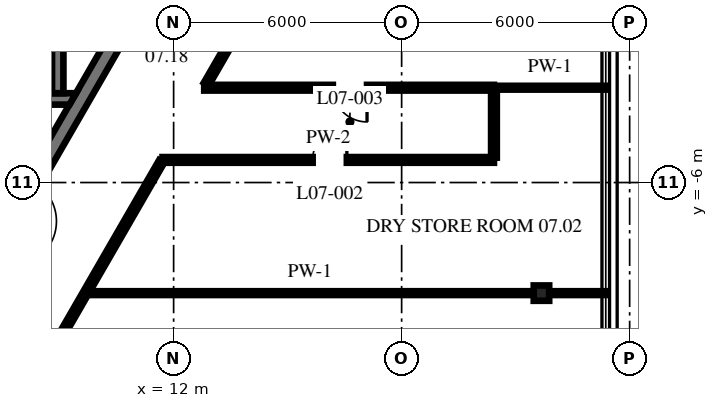
"""IFC4 building model, lengths in metres.
Left out: names, types, materials, properties, quantities, classifications, styles, units other than length and angle.
Written with IfcOpenShell. Run it as: python <this file> out.ifc"""

import sys

from ifc_helpers import new_model, si_unit, direction, frame, frame_2d, origin, origin_2d, place, context, subcontext, project, spatial, polyline, rectangle, i_section, outline, extrude, source, transform, mapped, element, fill, save


model = new_model("IFC4")
c1 = context("Model", 3, precision=1e-05, world=origin(), true_north=direction((0.0, 1.0)))
c2 = subcontext(c1, "Body", "Model", "MODEL_VIEW")
j1 = project(units=[si_unit("LENGTHUNIT", "METRE"), si_unit("PLANEANGLEUNIT", "RADIAN")], contexts=[c1])
p1 = place(None, origin())
s1 = spatial("IfcSite", under=j1, at=p1, CompositionType="ELEMENT")
p2 = place(p1, origin())
s2 = spatial("IfcBuilding", under=s1, at=p2, CompositionType="ELEMENT")
p3 = place(p2, frame((0.0, 0.0, 33.2)))
s3 = spatial("IfcBuildingStorey", under=s2, at=p3, CompositionType="ELEMENT", Elevation=33.2)
m1 = source(origin(), c2, "Body", "SweptSolid", [
    extrude(i_section(OverallWidth=0.404, OverallDepth=0.406, WebThickness=0.027, FlangeThickness=0.044, at=origin_2d()), origin(), (0.0, 0.0, 1.0), 4.3),
])
p4 = place(p3, frame((21.679, -8.91, 0.0), z_axis=(0.0, 0.0, 1.0), x_axis=(0.0, 1.0, 0.0)))
e1 = element("IfcColumn", 1, at=p4, inside=s3, PredefinedType="COLUMN", context=c2, shape_type="MappedRepresentation", body=[
    mapped(m1, transform((0.0, 0.0, 0.0), scale=1.0)),
])
m2 = source(origin(), c2, "Body", "SweptSolid", [
    extrude(outline(polyline([(-0.115, -0.2), (11.885, -0.2), (11.654, 0.2), (0.115, 0.2), (-0.115, -0.2)])), origin(), (0.0, 0.0, 1.0), 4.1),
])
p5 = place(p3, frame((5.885, -10.192, 0.0), z_axis=(0.0, 0.0, 1.0), x_axis=(0.499996592174, 0.866027371285, 0.0)))
e2 = element("IfcWall", 2, at=p5, inside=s3, PredefinedType="SHEAR", context=c2, shape_type="MappedRepresentation", body=[
    mapped(m2, transform((0.0, 0.0, 0.0), scale=1.0)),
])
p6 = place(p5, frame((3.665, 0.0, 0.0)))
e3 = element("IfcOpeningElement", 3, at=p6, cuts=e2, PredefinedType="OPENING", context=c2, shape_type="SweptSolid", body=[
    extrude(rectangle(XDim=1.2, YDim=2.1, at=frame_2d((0.6, 1.05))), frame((0.0, 0.21, 0.0), z_axis=(0.0, -1.0, 0.0), x_axis=(1.0, 0.0, 0.0)), (0.0, 0.0, 1.0), 0.42),
])
m3 = source(origin(), c2, "Body", "SweptSolid", [
    extrude(outline(polyline([(0.0, -0.15), (0.0, 0.15), (4.433, 0.15), (4.26, -0.15), (0.0, -0.15)])), origin(), (0.0, 0.0, 1.0), 4.1),
])
p7 = place(p3, frame((5.0, -3.8, 0.0), z_axis=(0.0, 0.0, 1.0), x_axis=(1.0, 0.0, 0.0)))
e4 = element("IfcWall", 4, at=p7, inside=s3, PredefinedType="SHEAR", context=c2, shape_type="MappedRepresentation", body=[
    mapped(m3, transform((0.0, 0.0, 0.0), scale=1.0)),
])
p8 = place(p7, frame((2.45, 0.0, 0.0)))
e5 = element("IfcOpeningElement", 5, at=p8, cuts=e4, PredefinedType="OPENING", context=c2, shape_type="SweptSolid", body=[
    extrude(rectangle(XDim=1.1, YDim=2.1, at=frame_2d((0.55, 1.05))), frame((0.0, 0.16, 0.0), z_axis=(0.0, -1.0, 0.0), x_axis=(1.0, 0.0, 0.0)), (0.0, 0.0, 1.0), 0.32),
])
m4 = source(origin(), c2, "Body", "SweptSolid", [
    extrude(rectangle(XDim=7.3, YDim=0.3, at=frame_2d((3.65, 0.0))), origin(), (0.0, 0.0, 1.0), 4.1),
])
p9 = place(p3, frame((8.95, -3.65, 0.0), z_axis=(0.0, 0.0, 1.0), x_axis=(0.0, 1.0, 0.0)))
e6 = element("IfcWall", 6, at=p9, inside=s3, PredefinedType="SHEAR", context=c2, shape_type="MappedRepresentation", body=[
    mapped(m4, transform((0.0, 0.0, 0.0), scale=1.0)),
])
m5 = source(origin(), c2, "Body", "SweptSolid", [
    extrude(rectangle(XDim=11.802, YDim=0.1, at=frame_2d((5.901, 0.0))), origin(), (0.0, 0.0, 1.0), 3.343),
])
p10 = place(p3, frame((9.685, -8.91, 0.0), z_axis=(0.0, 0.0, 1.0), x_axis=(1.0, 0.0, 0.0)))
e7 = element("IfcWall", 7, at=p10, inside=s3, PredefinedType="PARTITIONING", context=c2, shape_type="MappedRepresentation", body=[
    mapped(m5, transform((0.0, 0.0, 0.0), scale=1.0)),
])
m6 = source(origin(), c2, "Body", "SweptSolid", [
    extrude(rectangle(XDim=1.499, YDim=0.1, at=frame_2d((0.749, 0.0))), origin(), (0.0, 0.0, 1.0), 4.1),
])
p11 = place(p3, frame((21.873, -8.91, 0.0), z_axis=(0.0, 0.0, 1.0), x_axis=(1.0, 0.0, 0.0)))
e8 = element("IfcWall", 8, at=p11, inside=s3, PredefinedType="PARTITIONING", context=c2, shape_type="MappedRepresentation", body=[
    mapped(m6, transform((0.0, 0.0, 0.0), scale=1.0)),
])
m7 = source(origin(), c2, "Body", "SweptSolid", [
    extrude(rectangle(XDim=8.721, YDim=0.15, at=frame_2d((4.36, 0.0))), origin(), (0.0, 0.0, 1.0), 4.1),
])
p12 = place(p3, frame((11.708, -5.405, 0.0), z_axis=(0.0, 0.0, 1.0), x_axis=(1.0, 0.0, 0.0)))
e9 = element("IfcWall", 9, at=p12, inside=s3, PredefinedType="PARTITIONING", context=c2, shape_type="MappedRepresentation", body=[
    mapped(m7, transform((0.0, 0.0, 0.0), scale=1.0)),
])
p13 = place(p12, frame((3.95, 0.0, 0.0)))
e10 = element("IfcOpeningElement", 10, at=p13, cuts=e9, PredefinedType="OPENING", context=c2, shape_type="SweptSolid", body=[
    extrude(rectangle(XDim=0.9, YDim=2.1, at=frame_2d((0.45, 1.05))), frame((0.0, 0.085, 0.0), z_axis=(0.0, -1.0, 0.0), x_axis=(1.0, 0.0, 0.0)), (0.0, 0.0, 1.0), 0.17),
])
m8 = source(origin(), c2, "Body", "SweptSolid", [
    extrude(rectangle(XDim=7.624, YDim=0.15, at=frame_2d((3.812, 0.0))), origin(), (0.0, 0.0, 1.0), 4.1),
])
p14 = place(p3, frame((12.805, -3.505, 0.0), z_axis=(0.0, 0.0, 1.0), x_axis=(1.0, 0.0, 0.0)))
e11 = element("IfcWall", 11, at=p14, inside=s3, PredefinedType="PARTITIONING", context=c2, shape_type="MappedRepresentation", body=[
    mapped(m8, transform((0.0, 0.0, 0.0), scale=1.0)),
])
p15 = place(p14, frame((3.384, 0.0, 0.0)))
e12 = element("IfcOpeningElement", 12, at=p15, cuts=e11, PredefinedType="OPENING", context=c2, shape_type="SweptSolid", body=[
    extrude(rectangle(XDim=0.9, YDim=2.1, at=frame_2d((0.45, 1.05))), frame((0.0, 0.085, 0.0), z_axis=(0.0, -1.0, 0.0), x_axis=(1.0, 0.0, 0.0)), (0.0, 0.0, 1.0), 0.17),
])
m9 = source(origin(), c2, "Body", "SweptSolid", [
    extrude(rectangle(XDim=2.942, YDim=0.1, at=frame_2d((1.471, 0.0))), origin(), (0.0, 0.0, 1.0), 4.1),
])
p16 = place(p3, frame((20.429, -3.505, 0.0), z_axis=(0.0, 0.0, 1.0), x_axis=(1.0, 0.0, 0.0)))
e13 = element("IfcWall", 13, at=p16, inside=s3, PredefinedType="PARTITIONING", context=c2, shape_type="MappedRepresentation", body=[
    mapped(m9, transform((0.0, 0.0, 0.0), scale=1.0)),
])
m10 = source(origin(), c2, "Body", "SweptSolid", [
    extrude(rectangle(XDim=8.468, YDim=0.15, at=frame_2d((4.234, 0.0))), origin(), (0.0, 0.0, 1.0), 4.1),
])
p17 = place(p3, frame((7.449, -12.782, 0.0), z_axis=(0.0, 0.0, 1.0), x_axis=(0.499990325971, 0.866030989016, 0.0)))
e14 = element("IfcWall", 14, at=p17, inside=s3, PredefinedType="PARTITIONING", context=c2, shape_type="MappedRepresentation", body=[
    mapped(m10, transform((0.0, 0.0, 0.0), scale=1.0)),
])
p18 = place(p17, frame((1.78, 0.0, 0.0)))
e15 = element("IfcOpeningElement", 15, at=p18, cuts=e14, PredefinedType="OPENING", context=c2, shape_type="SweptSolid", body=[
    extrude(rectangle(XDim=0.9, YDim=2.1, at=frame_2d((0.45, 1.05))), frame((0.0, 0.085, 0.0), z_axis=(0.0, -1.0, 0.0), x_axis=(1.0, 0.0, 0.0)), (0.0, 0.0, 1.0), 0.17),
])
m11 = source(origin(), c2, "Body", "SweptSolid", [
    extrude(rectangle(XDim=3.867, YDim=0.15, at=frame_2d((1.934, 0.0))), origin(), (0.0, 0.0, 1.0), 4.1),
])
p19 = place(p3, frame((12.86, -3.41, 0.0), z_axis=(0.0, 0.0, 1.0), x_axis=(0.499995691662, 0.86602789119, 0.0)))
e16 = element("IfcWall", 16, at=p19, inside=s3, PredefinedType="PARTITIONING", context=c2, shape_type="MappedRepresentation", body=[
    mapped(m11, transform((0.0, 0.0, 0.0), scale=1.0)),
])
m12 = source(origin(), c2, "Body", "SweptSolid", [
    extrude(rectangle(XDim=1.78, YDim=0.15, at=frame_2d((0.89, 0.0))), origin(), (0.0, 0.0, 1.0), 4.1),
])
p20 = place(p3, frame((20.429, -5.345, 0.0), z_axis=(0.0, 0.0, 1.0), x_axis=(0.0, 1.0, 0.0)))
e17 = element("IfcWall", 17, at=p20, inside=s3, PredefinedType="PARTITIONING", context=c2, shape_type="MappedRepresentation", body=[
    mapped(m12, transform((0.0, 0.0, 0.0), scale=1.0)),
])
p21 = place(p13, origin())
e18 = element("IfcDoor", 18, at=p21, inside=s3, OperationType="SINGLE_SWING_LEFT", PredefinedType="DOOR", context=c2, shape_type="SweptSolid", body=[
    extrude(rectangle(XDim=0.9, YDim=2.1, at=frame_2d((0.45, 1.05))), frame((0.0, 0.025, 0.0), z_axis=(0.0, -1.0, 0.0), x_axis=(1.0, 0.0, 0.0)), (0.0, 0.0, 1.0), 0.05),
])
fill(e10, e18)
p22 = place(p15, origin())
e19 = element("IfcDoor", 19, at=p22, inside=s3, OperationType="SINGLE_SWING_RIGHT", PredefinedType="DOOR", context=c2, shape_type="SweptSolid", body=[
    extrude(rectangle(XDim=0.9, YDim=2.1, at=frame_2d((0.45, 1.05))), frame((0.0, 0.025, 0.0), z_axis=(0.0, -1.0, 0.0), x_axis=(1.0, 0.0, 0.0)), (0.0, 0.0, 1.0), 0.05),
])
fill(e12, e19)
save(model, sys.argv[1])
